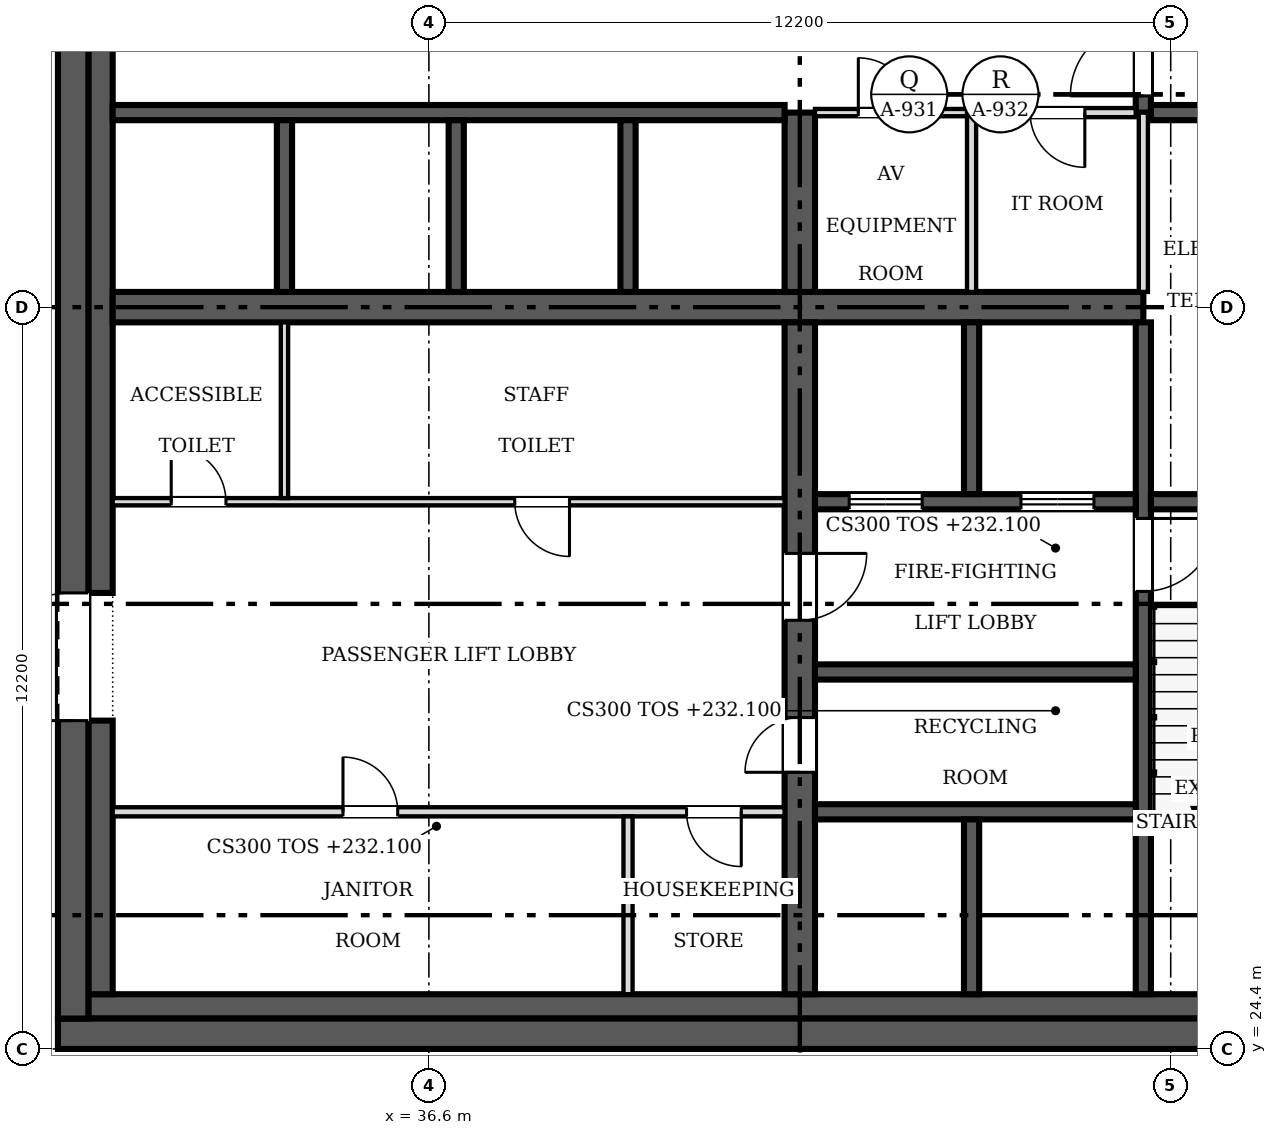
"""IFC4 building model, lengths in metres.
Left out: names, types, materials, properties, quantities, classifications, styles, units other than length and angle.
Written with IfcOpenShell. Run it as: python <this file> out.ifc"""

import sys

from ifc_helpers import new_model, si_unit, direction, frame, frame_2d, origin, place, context, subcontext, project, spatial, rectangle, extrude, source, transform, mapped, element, fill, save


model = new_model("IFC4")
c1 = context("Model", 3, precision=1e-05, world=origin(), true_north=direction((0.0, 1.0)))
c2 = subcontext(c1, "Body", "Model", "MODEL_VIEW")
j1 = project(units=[si_unit("LENGTHUNIT", "METRE"), si_unit("PLANEANGLEUNIT", "RADIAN")], contexts=[c1])
p1 = place(None, origin())
s1 = spatial("IfcSite", under=j1, at=p1, CompositionType="ELEMENT")
p2 = place(p1, origin())
s2 = spatial("IfcBuilding", under=s1, at=p2, CompositionType="ELEMENT")
p3 = place(p2, frame((0.0, 0.0, 232.1)))
s3 = spatial("IfcBuildingStorey", under=s2, at=p3, CompositionType="ELEMENT", Elevation=232.1)
p4 = place(p3, frame((54.9, 24.65, 0.0), z_axis=(0.0, 0.0, 1.0), x_axis=(-1.0, 0.0, 0.0)))
e1 = element("IfcWall", 1, at=p4, inside=s3, PredefinedType="SHEAR", context=c2, shape_type="SweptSolid", body=[
    extrude(rectangle(XDim=24.4, YDim=0.5, at=frame_2d((12.2, 0.0))), origin(), (0.0, 0.0, 1.0), 4.8),
])
m1 = source(origin(), c2, "Body", "SweptSolid", [
    extrude(rectangle(XDim=1.2, YDim=2.1, at=frame_2d((0.6, 1.05))), frame((0.0, 0.26, 0.0), z_axis=(0.0, -1.0, 0.0), x_axis=(1.0, 0.0, 0.0)), (0.0, 0.0, 1.0), 0.52),
])
p5 = place(p4, frame((1.5, 0.0, 0.0)))
e2 = element("IfcOpeningElement", 2, at=p5, cuts=e1, PredefinedType="OPENING", context=c2, shape_type="MappedRepresentation", body=[
    mapped(m1, transform((0.0, 0.0, 0.0), scale=1.0)),
])
p6 = place(p3, frame((30.75, 24.9, 0.0), z_axis=(0.0, 0.0, 1.0), x_axis=(0.0, 1.0, 0.0)))
e3 = element("IfcWall", 3, at=p6, inside=s3, PredefinedType="SHEAR", context=c2, shape_type="SweptSolid", body=[
    extrude(rectangle(XDim=23.4, YDim=0.5, at=frame_2d((11.7, 0.0))), origin(), (0.0, 0.0, 1.0), 4.8),
])
m2 = source(origin(), c2, "Body", "SweptSolid", [
    extrude(rectangle(XDim=2.1, YDim=2.4, at=frame_2d((1.05, 1.2))), frame((0.0, 0.26, 0.0), z_axis=(0.0, -1.0, 0.0), x_axis=(1.0, 0.0, 0.0)), (0.0, 0.0, 1.0), 0.52),
])
p7 = place(p6, frame((4.9, 0.0, 0.0)))
e4 = element("IfcOpeningElement", 4, at=p7, cuts=e3, PredefinedType="OPENING", context=c2, shape_type="MappedRepresentation", body=[
    mapped(m2, transform((0.0, 0.0, 0.0), scale=1.0)),
])
p8 = place(p6, frame((16.4, 0.0, 0.0)))
e5 = element("IfcOpeningElement", 5, at=p8, cuts=e3, PredefinedType="OPENING", context=c2, shape_type="MappedRepresentation", body=[
    mapped(m2, transform((0.0, 0.0, 0.0), scale=1.0)),
])
p9 = place(p3, frame((31.0, 25.1, 0.0), z_axis=(0.0, 0.0, 1.0), x_axis=(1.0, 0.0, 0.0)))
e6 = element("IfcWall", 6, at=p9, inside=s3, PredefinedType="SOLIDWALL", context=c2, shape_type="SweptSolid", body=[
    extrude(rectangle(XDim=21.2, YDim=0.4, at=frame_2d((10.6, 0.0))), origin(), (0.0, 0.0, 1.0), 4.8),
])
p10 = place(p3, frame((31.2, 25.3, 0.0), z_axis=(0.0, 0.0, 1.0), x_axis=(0.0, 1.0, 0.0)))
e7 = element("IfcWall", 7, at=p10, inside=s3, PredefinedType="SOLIDWALL", context=c2, shape_type="SweptSolid", body=[
    extrude(rectangle(XDim=4.5, YDim=0.4, at=frame_2d((2.25, 0.0))), origin(), (0.0, 0.0, 1.0), 4.8),
])
p11 = place(p3, frame((31.2, 31.9, 0.0), z_axis=(0.0, 0.0, 1.0), x_axis=(0.0, 1.0, 0.0)))
e8 = element("IfcWall", 8, at=p11, inside=s3, PredefinedType="SOLIDWALL", context=c2, shape_type="SweptSolid", body=[
    extrude(rectangle(XDim=9.4, YDim=0.4, at=frame_2d((4.7, 0.0))), origin(), (0.0, 0.0, 1.0), 4.8),
])
p12 = place(p3, frame((31.4, 36.6, 0.0), z_axis=(0.0, 0.0, 1.0), x_axis=(1.0, 0.0, 0.0)))
e9 = element("IfcWall", 9, at=p12, inside=s3, PredefinedType="SHEAR", context=c2, shape_type="SweptSolid", body=[
    extrude(rectangle(XDim=16.95, YDim=0.5, at=frame_2d((8.475, 0.0))), origin(), (0.0, 0.0, 1.0), 4.8),
])
p13 = place(p3, frame((42.7, 36.35, 0.0), z_axis=(0.0, 0.0, 1.0), x_axis=(0.0, -1.0, 0.0)))
e10 = element("IfcWall", 10, at=p13, inside=s3, PredefinedType="SHEAR", context=c2, shape_type="SweptSolid", body=[
    extrude(rectangle(XDim=11.05, YDim=0.5, at=frame_2d((5.525, 0.0))), origin(), (0.0, 0.0, 1.0), 4.8),
])
m3 = source(origin(), c2, "Body", "SweptSolid", [
    extrude(rectangle(XDim=0.9, YDim=2.1, at=frame_2d((0.45, 1.05))), frame((0.0, 0.26, 0.0), z_axis=(0.0, -1.0, 0.0), x_axis=(1.0, 0.0, 0.0)), (0.0, 0.0, 1.0), 0.52),
])
p14 = place(p13, frame((6.5, 0.0, 0.0)))
e11 = element("IfcOpeningElement", 11, at=p14, cuts=e10, PredefinedType="OPENING", context=c2, shape_type="MappedRepresentation", body=[
    mapped(m3, transform((0.0, 0.0, 0.0), scale=1.0)),
])
m4 = source(origin(), c2, "Body", "SweptSolid", [
    extrude(rectangle(XDim=1.1, YDim=2.1, at=frame_2d((0.55, 1.05))), frame((0.0, 0.26, 0.0), z_axis=(0.0, -1.0, 0.0), x_axis=(1.0, 0.0, 0.0)), (0.0, 0.0, 1.0), 0.52),
])
p15 = place(p13, frame((3.8, 0.0, 0.0)))
e12 = element("IfcOpeningElement", 12, at=p15, cuts=e10, PredefinedType="OPENING", context=c2, shape_type="MappedRepresentation", body=[
    mapped(m4, transform((0.0, 0.0, 0.0), scale=1.0)),
])
p16 = place(p3, frame((42.7, 36.85, 0.0), z_axis=(0.0, 0.0, 1.0), x_axis=(0.0, 1.0, 0.0)))
e13 = element("IfcWall", 13, at=p16, inside=s3, PredefinedType="SHEAR", context=c2, shape_type="SweptSolid", body=[
    extrude(rectangle(XDim=2.95, YDim=0.5, at=frame_2d((1.475, 0.0))), origin(), (0.0, 0.0, 1.0), 4.8),
])
p17 = place(p3, frame((31.4, 39.8, 0.0), z_axis=(0.0, 0.0, 1.0), x_axis=(1.0, 0.0, 0.0)))
e14 = element("IfcWall", 14, at=p17, inside=s3, PredefinedType="SOLIDWALL", context=c2, shape_type="SweptSolid", body=[
    extrude(rectangle(XDim=11.05, YDim=0.25, at=frame_2d((5.525, 0.0))), origin(), (0.0, 0.0, 1.0), 4.8),
])
p18 = place(p3, frame((48.35, 36.35, 0.0), z_axis=(0.0, 0.0, 1.0), x_axis=(0.0, -1.0, 0.0)))
e15 = element("IfcWall", 15, at=p18, inside=s3, PredefinedType="SOLIDWALL", context=c2, shape_type="SweptSolid", body=[
    extrude(rectangle(XDim=11.05, YDim=0.25, at=frame_2d((5.525, 0.0))), origin(), (0.0, 0.0, 1.0), 4.8),
])
m5 = source(origin(), c2, "Body", "SweptSolid", [
    extrude(rectangle(XDim=1.2, YDim=2.1, at=frame_2d((0.6, 1.05))), frame((0.0, 0.135, 0.0), z_axis=(0.0, -1.0, 0.0), x_axis=(1.0, 0.0, 0.0)), (0.0, 0.0, 1.0), 0.27),
])
p19 = place(p18, frame((3.225, 0.0, 0.0)))
e16 = element("IfcOpeningElement", 16, at=p19, cuts=e15, PredefinedType="OPENING", context=c2, shape_type="MappedRepresentation", body=[
    mapped(m5, transform((0.0, 0.0, 0.0), scale=1.0)),
])
p20 = place(p3, frame((48.225, 33.4, 0.0), z_axis=(0.0, 0.0, 1.0), x_axis=(-1.0, 0.0, 0.0)))
e17 = element("IfcWall", 17, at=p20, inside=s3, PredefinedType="SOLIDWALL", context=c2, shape_type="SweptSolid", body=[
    extrude(rectangle(XDim=5.275, YDim=0.25, at=frame_2d((2.638, 0.0))), origin(), (0.0, 0.0, 1.0), 4.8),
])
p21 = place(p20, frame((3.512, 0.0, 0.0)))
e18 = element("IfcOpeningElement", 18, at=p21, cuts=e17, PredefinedType="OPENING", context=c2, shape_type="MappedRepresentation", body=[
    mapped(m5, transform((0.0, 0.0, 0.0), scale=1.0)),
])
p22 = place(p20, frame((0.688, 0.0, 0.0)))
e19 = element("IfcOpeningElement", 19, at=p22, cuts=e17, PredefinedType="OPENING", context=c2, shape_type="MappedRepresentation", body=[
    mapped(m5, transform((0.0, 0.0, 0.0), scale=1.0)),
])
p23 = place(p3, frame((48.475, 33.4, 0.0), z_axis=(0.0, 0.0, 1.0), x_axis=(1.0, 0.0, 0.0)))
e20 = element("IfcWall", 20, at=p23, inside=s3, PredefinedType="SOLIDWALL", context=c2, shape_type="SweptSolid", body=[
    extrude(rectangle(XDim=3.525, YDim=0.25, at=frame_2d((1.762, 0.0))), origin(), (0.0, 0.0, 1.0), 4.8),
])
p24 = place(p3, frame((48.35, 47.9, 0.0), z_axis=(0.0, 0.0, 1.0), x_axis=(0.0, -1.0, 0.0)))
e21 = element("IfcWall", 21, at=p24, inside=s3, PredefinedType="SOLIDWALL", context=c2, shape_type="SweptSolid", body=[
    extrude(rectangle(XDim=8.1, YDim=0.25, at=frame_2d((4.05, 0.0))), origin(), (0.0, 0.0, 1.0), 4.8),
])
p25 = place(p24, frame((6.625, 0.0, 0.0)))
e22 = element("IfcOpeningElement", 22, at=p25, cuts=e21, PredefinedType="OPENING", context=c2, shape_type="MappedRepresentation", body=[
    mapped(m5, transform((0.0, 0.0, 0.0), scale=1.0)),
])
for number, where, z_axis, x_axis in (
    (23, (42.95, 28.3, 0.0), (0.0, 0.0, 1.0), (1.0, 0.0, 0.0)),
    (24, (42.95, 30.6, 0.0), (0.0, 0.0, 1.0), (1.0, 0.0, 0.0)),
):
    element("IfcWall", number, at=place(p3, frame(where, z_axis=z_axis, x_axis=x_axis)), inside=s3, PredefinedType="SOLIDWALL", context=c2, shape_type="SweptSolid", body=[
        extrude(rectangle(XDim=5.275, YDim=0.25, at=frame_2d((2.638, 0.0))), origin(), (0.0, 0.0, 1.0), 4.8),
    ])
p26 = place(p3, frame((48.475, 39.8, 0.0), z_axis=(0.0, 0.0, 1.0), x_axis=(1.0, 0.0, 0.0)))
e25 = element("IfcWall", 25, at=p26, inside=s3, PredefinedType="SOLIDWALL", context=c2, shape_type="SweptSolid", body=[
    extrude(rectangle(XDim=3.4, YDim=0.25, at=frame_2d((1.7, 0.0))), origin(), (0.0, 0.0, 1.0), 4.8),
])
for number, where, z_axis, x_axis in (
    (26, (34.225, 36.85, 0.0), (0.0, 0.0, 1.0), (0.0, 1.0, 0.0)),
    (27, (37.05, 36.85, 0.0), (0.0, 0.0, 1.0), (0.0, 1.0, 0.0)),
    (28, (39.875, 36.85, 0.0), (0.0, 0.0, 1.0), (0.0, 1.0, 0.0)),
):
    element("IfcWall", number, at=place(p3, frame(where, z_axis=z_axis, x_axis=x_axis)), inside=s3, PredefinedType="SOLIDWALL", context=c2, shape_type="SweptSolid", body=[
        extrude(rectangle(XDim=2.825, YDim=0.25, at=frame_2d((1.413, 0.0))), origin(), (0.0, 0.0, 1.0), 4.8),
    ])
p27 = place(p3, frame((45.525, 33.525, 0.0), z_axis=(0.0, 0.0, 1.0), x_axis=(0.0, 1.0, 0.0)))
e29 = element("IfcWall", 29, at=p27, inside=s3, PredefinedType="SOLIDWALL", context=c2, shape_type="SweptSolid", body=[
    extrude(rectangle(XDim=2.825, YDim=0.25, at=frame_2d((1.413, 0.0))), origin(), (0.0, 0.0, 1.0), 4.8),
])
p28 = place(p3, frame((45.525, 25.3, 0.0), z_axis=(0.0, 0.0, 1.0), x_axis=(0.0, 1.0, 0.0)))
e30 = element("IfcWall", 30, at=p28, inside=s3, PredefinedType="SOLIDWALL", context=c2, shape_type="SweptSolid", body=[
    extrude(rectangle(XDim=2.875, YDim=0.25, at=frame_2d((1.438, 0.0))), origin(), (0.0, 0.0, 1.0), 4.8),
])
p29 = place(p3, frame((42.45, 28.3, 0.0), z_axis=(0.0, 0.0, 1.0), x_axis=(-1.0, 0.0, 0.0)))
e31 = element("IfcWall", 31, at=p29, inside=s3, PredefinedType="PARTITIONING", context=c2, shape_type="SweptSolid", body=[
    extrude(rectangle(XDim=11.05, YDim=0.15, at=frame_2d((5.525, 0.0))), origin(), (0.0, 0.0, 1.0), 4.6),
])
m6 = source(origin(), c2, "Body", "SweptSolid", [
    extrude(rectangle(XDim=0.9, YDim=2.1, at=frame_2d((0.45, 1.05))), frame((0.0, 0.085, 0.0), z_axis=(0.0, -1.0, 0.0), x_axis=(1.0, 0.0, 0.0)), (0.0, 0.0, 1.0), 0.17),
])
p30 = place(p29, frame((6.363, 0.0, 0.0)))
e32 = element("IfcOpeningElement", 32, at=p30, cuts=e31, PredefinedType="OPENING", context=c2, shape_type="MappedRepresentation", body=[
    mapped(m6, transform((0.0, 0.0, 0.0), scale=1.0)),
])
p31 = place(p29, frame((0.712, 0.0, 0.0)))
e33 = element("IfcOpeningElement", 33, at=p31, cuts=e31, PredefinedType="OPENING", context=c2, shape_type="MappedRepresentation", body=[
    mapped(m6, transform((0.0, 0.0, 0.0), scale=1.0)),
])
p32 = place(p3, frame((31.4, 33.4, 0.0), z_axis=(0.0, 0.0, 1.0), x_axis=(1.0, 0.0, 0.0)))
e34 = element("IfcWall", 34, at=p32, inside=s3, PredefinedType="PARTITIONING", context=c2, shape_type="SweptSolid", body=[
    extrude(rectangle(XDim=11.05, YDim=0.12, at=frame_2d((5.525, 0.0))), origin(), (0.0, 0.0, 1.0), 4.6),
])
m7 = source(origin(), c2, "Body", "SweptSolid", [
    extrude(rectangle(XDim=0.9, YDim=2.1, at=frame_2d((0.45, 1.05))), frame((0.0, 0.07, 0.0), z_axis=(0.0, -1.0, 0.0), x_axis=(1.0, 0.0, 0.0)), (0.0, 0.0, 1.0), 0.14),
])
p33 = place(p32, frame((0.962, 0.0, 0.0)))
e35 = element("IfcOpeningElement", 35, at=p33, cuts=e34, PredefinedType="OPENING", context=c2, shape_type="MappedRepresentation", body=[
    mapped(m7, transform((0.0, 0.0, 0.0), scale=1.0)),
])
p34 = place(p32, frame((6.613, 0.0, 0.0)))
e36 = element("IfcOpeningElement", 36, at=p34, cuts=e34, PredefinedType="OPENING", context=c2, shape_type="MappedRepresentation", body=[
    mapped(m7, transform((0.0, 0.0, 0.0), scale=1.0)),
])
for number, where, z_axis, x_axis in (
    (37, (45.525, 36.85, 0.0), (0.0, 0.0, 1.0), (0.0, 1.0, 0.0)),
    (38, (48.35, 36.85, 0.0), (0.0, 0.0, 1.0), (0.0, 1.0, 0.0)),
):
    element("IfcWall", number, at=place(p3, frame(where, z_axis=z_axis, x_axis=x_axis)), inside=s3, PredefinedType="PARTITIONING", context=c2, shape_type="SweptSolid", body=[
        extrude(rectangle(XDim=2.95, YDim=0.15, at=frame_2d((1.475, 0.0))), origin(), (0.0, 0.0, 1.0), 4.6),
    ])
p35 = place(p3, frame((34.225, 33.46, 0.0), z_axis=(0.0, 0.0, 1.0), x_axis=(0.0, 1.0, 0.0)))
e39 = element("IfcWall", 39, at=p35, inside=s3, PredefinedType="PARTITIONING", context=c2, shape_type="SweptSolid", body=[
    extrude(rectangle(XDim=2.89, YDim=0.12, at=frame_2d((1.445, 0.0))), origin(), (0.0, 0.0, 1.0), 4.6),
])
p36 = place(p3, frame((39.875, 25.3, 0.0), z_axis=(0.0, 0.0, 1.0), x_axis=(0.0, 1.0, 0.0)))
e40 = element("IfcWall", 40, at=p36, inside=s3, PredefinedType="PARTITIONING", context=c2, shape_type="SweptSolid", body=[
    extrude(rectangle(XDim=2.925, YDim=0.15, at=frame_2d((1.462, 0.0))), origin(), (0.0, 0.0, 1.0), 4.6),
])
p37 = place(p3, frame((45.45, 39.8, 0.0), z_axis=(0.0, 0.0, 1.0), x_axis=(-1.0, 0.0, 0.0)))
e41 = element("IfcWall", 41, at=p37, inside=s3, PredefinedType="PARTITIONING", context=c2, shape_type="SweptSolid", body=[
    extrude(rectangle(XDim=2.5, YDim=0.12, at=frame_2d((1.25, 0.0))), origin(), (0.0, 0.0, 1.0), 4.6),
])
p38 = place(p37, frame((0.887, 0.0, 0.0)))
e42 = element("IfcOpeningElement", 42, at=p38, cuts=e41, PredefinedType="OPENING", context=c2, shape_type="MappedRepresentation", body=[
    mapped(m7, transform((0.0, 0.0, 0.0), scale=1.0)),
])
p39 = place(p3, frame((48.225, 39.8, 0.0), z_axis=(0.0, 0.0, 1.0), x_axis=(-1.0, 0.0, 0.0)))
e43 = element("IfcWall", 43, at=p39, inside=s3, PredefinedType="PARTITIONING", context=c2, shape_type="SweptSolid", body=[
    extrude(rectangle(XDim=2.625, YDim=0.15, at=frame_2d((1.312, 0.0))), origin(), (0.0, 0.0, 1.0), 4.6),
])
p40 = place(p39, frame((0.837, 0.0, 0.0)))
e44 = element("IfcOpeningElement", 44, at=p40, cuts=e43, PredefinedType="OPENING", context=c2, shape_type="MappedRepresentation", body=[
    mapped(m6, transform((0.0, 0.0, 0.0), scale=1.0)),
])
m8 = source(origin(), c2, "Body", "SweptSolid", [
    extrude(rectangle(XDim=2.1, YDim=2.4, at=frame_2d((1.05, 1.2))), frame((0.0, 0.025, 0.0), z_axis=(0.0, -1.0, 0.0), x_axis=(1.0, 0.0, 0.0)), (0.0, 0.0, 1.0), 0.05),
])
p41 = place(p7, origin())
e45 = element("IfcDoor", 45, at=p41, inside=s3, OperationType="DOUBLE_DOOR_SINGLE_SWING", PredefinedType="DOOR", context=c2, shape_type="MappedRepresentation", body=[
    mapped(m8, transform((0.0, 0.0, 0.0), scale=1.0)),
])
fill(e4, e45)
m9 = source(origin(), c2, "Body", "SweptSolid", [
    extrude(rectangle(XDim=0.9, YDim=2.1, at=frame_2d((0.45, 1.05))), frame((0.0, 0.025, 0.0), z_axis=(0.0, -1.0, 0.0), x_axis=(1.0, 0.0, 0.0)), (0.0, 0.0, 1.0), 0.05),
])
p42 = place(p14, origin())
e46 = element("IfcDoor", 46, at=p42, inside=s3, OperationType="SINGLE_SWING_RIGHT", PredefinedType="DOOR", context=c2, shape_type="MappedRepresentation", body=[
    mapped(m9, transform((0.0, 0.0, 0.0), scale=1.0)),
])
fill(e11, e46)
m10 = source(origin(), c2, "Body", "SweptSolid", [
    extrude(rectangle(XDim=1.1, YDim=2.1, at=frame_2d((0.55, 1.05))), frame((0.0, 0.025, 0.0), z_axis=(0.0, -1.0, 0.0), x_axis=(1.0, 0.0, 0.0)), (0.0, 0.0, 1.0), 0.05),
])
p43 = place(p15, origin())
e47 = element("IfcDoor", 47, at=p43, inside=s3, OperationType="SINGLE_SWING_LEFT", PredefinedType="DOOR", context=c2, shape_type="MappedRepresentation", body=[
    mapped(m10, transform((0.0, 0.0, 0.0), scale=1.0)),
])
fill(e12, e47)
m11 = source(origin(), c2, "Body", "SweptSolid", [
    extrude(rectangle(XDim=1.2, YDim=2.1, at=frame_2d((0.6, 1.05))), frame((0.0, 0.025, 0.0), z_axis=(0.0, -1.0, 0.0), x_axis=(1.0, 0.0, 0.0)), (0.0, 0.0, 1.0), 0.05),
])
p44 = place(p19, origin())
e48 = element("IfcDoor", 48, at=p44, inside=s3, OperationType="SINGLE_SWING_LEFT", PredefinedType="DOOR", context=c2, shape_type="MappedRepresentation", body=[
    mapped(m11, transform((0.0, 0.0, 0.0), scale=1.0)),
])
fill(e16, e48)
p45 = place(p21, origin())
e49 = element("IfcDoor", 49, at=p45, inside=s3, OperationType="DOUBLE_DOOR_SLIDING", PredefinedType="DOOR", context=c2, shape_type="MappedRepresentation", body=[
    mapped(m11, transform((0.0, 0.0, 0.0), scale=1.0)),
])
fill(e18, e49)
p46 = place(p22, origin())
e50 = element("IfcDoor", 50, at=p46, inside=s3, OperationType="DOUBLE_DOOR_SLIDING", PredefinedType="DOOR", context=c2, shape_type="MappedRepresentation", body=[
    mapped(m11, transform((0.0, 0.0, 0.0), scale=1.0)),
])
fill(e19, e50)
p47 = place(p25, origin())
e51 = element("IfcDoor", 51, at=p47, inside=s3, OperationType="SINGLE_SWING_RIGHT", PredefinedType="DOOR", context=c2, shape_type="MappedRepresentation", body=[
    mapped(m11, transform((0.0, 0.0, 0.0), scale=1.0)),
])
fill(e22, e51)
p48 = place(p30, origin())
e52 = element("IfcDoor", 52, at=p48, inside=s3, OperationType="SINGLE_SWING_RIGHT", PredefinedType="DOOR", context=c2, shape_type="MappedRepresentation", body=[
    mapped(m9, transform((0.0, 0.0, 0.0), scale=1.0)),
])
fill(e32, e52)
p49 = place(p31, origin())
e53 = element("IfcDoor", 53, at=p49, inside=s3, OperationType="SINGLE_SWING_LEFT", PredefinedType="DOOR", context=c2, shape_type="MappedRepresentation", body=[
    mapped(m9, transform((0.0, 0.0, 0.0), scale=1.0)),
])
fill(e33, e53)
p50 = place(p33, origin())
e54 = element("IfcDoor", 54, at=p50, inside=s3, OperationType="SINGLE_SWING_LEFT", PredefinedType="DOOR", context=c2, shape_type="MappedRepresentation", body=[
    mapped(m9, transform((0.0, 0.0, 0.0), scale=1.0)),
])
fill(e35, e54)
p51 = place(p34, origin())
e55 = element("IfcDoor", 55, at=p51, inside=s3, OperationType="SINGLE_SWING_RIGHT", PredefinedType="DOOR", context=c2, shape_type="MappedRepresentation", body=[
    mapped(m9, transform((0.0, 0.0, 0.0), scale=1.0)),
])
fill(e36, e55)
p52 = place(p38, origin())
e56 = element("IfcDoor", 56, at=p52, inside=s3, OperationType="SINGLE_SWING_RIGHT", PredefinedType="DOOR", context=c2, shape_type="MappedRepresentation", body=[
    mapped(m9, transform((0.0, 0.0, 0.0), scale=1.0)),
])
fill(e42, e56)
p53 = place(p40, origin())
e57 = element("IfcDoor", 57, at=p53, inside=s3, OperationType="SINGLE_SWING_LEFT", PredefinedType="DOOR", context=c2, shape_type="MappedRepresentation", body=[
    mapped(m9, transform((0.0, 0.0, 0.0), scale=1.0)),
])
fill(e44, e57)
save(model, sys.argv[1])
